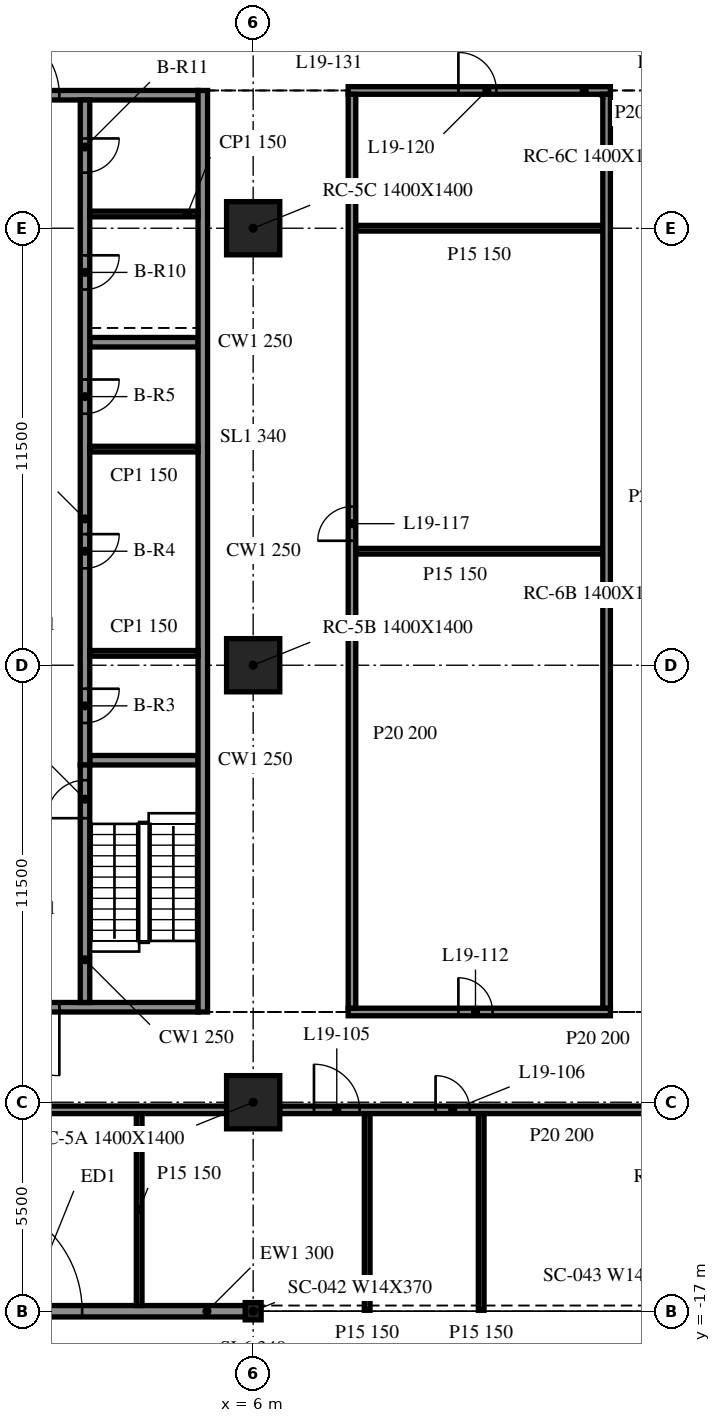
"""IFC4 building model, lengths in metres.
Left out: names, types, materials, properties, quantities, classifications, styles, units other than length and angle.
Written with IfcOpenShell. Run it as: python <this file> out.ifc"""

import sys

from ifc_helpers import new_model, si_unit, direction, frame, frame_2d, origin, origin_2d, place, context, subcontext, project, spatial, rectangle, i_section, extrude, element, fill, save


model = new_model("IFC4")
c1 = context("Model", 3, precision=1e-05, world=origin(), true_north=direction((0.0, 1.0)))
c2 = subcontext(c1, "Body", "Model", "MODEL_VIEW")
j1 = project(units=[si_unit("LENGTHUNIT", "METRE"), si_unit("PLANEANGLEUNIT", "RADIAN")], contexts=[c1])
p1 = place(None, origin())
s1 = spatial("IfcSite", under=j1, at=p1, CompositionType="ELEMENT")
p2 = place(p1, origin())
s2 = spatial("IfcBuilding", under=s1, at=p2, CompositionType="ELEMENT")
p3 = place(p2, frame((0.0, 0.0, 84.8)))
s3 = spatial("IfcBuildingStorey", under=s2, at=p3, CompositionType="ELEMENT", Elevation=84.8)
for number, where, z_axis, x_axis in (
    (1, (6.0, -11.5, -0.34), (0.0, 0.0, 1.0), (1.0, 0.0, 0.0)),
    (2, (6.0, 0.0, -0.34), (0.0, 0.0, 1.0), (1.0, 0.0, 0.0)),
    (3, (6.0, 11.5, -0.34), (0.0, 0.0, 1.0), (1.0, 0.0, 0.0)),
):
    element("IfcColumn", number, at=place(p3, frame(where, z_axis=z_axis, x_axis=x_axis)), inside=s3, PredefinedType="COLUMN", context=c2, shape_type="SweptSolid", body=[
        extrude(rectangle(XDim=1.4, YDim=1.4, at=origin_2d()), origin(), (0.0, 0.0, 1.0), 4.1),
    ])
p4 = place(p3, frame((6.0, -17.0, -0.34), z_axis=(0.0, 0.0, 1.0), x_axis=(1.0, 0.0, 0.0)))
e4 = element("IfcColumn", 4, at=p4, inside=s3, PredefinedType="COLUMN", context=c2, shape_type="SweptSolid", body=[
    extrude(i_section(OverallWidth=0.419, OverallDepth=0.455, WebThickness=0.042, FlangeThickness=0.068, at=origin_2d()), origin(), (0.0, 0.0, 1.0), 4.1),
])
p5 = place(p3, frame((-5.979, -17.0, 0.0), z_axis=(0.0, 0.0, 1.0), x_axis=(1.0, 0.0, 0.0)))
e5 = element("IfcWall", 5, at=p5, inside=s3, PredefinedType="NOTDEFINED", context=c2, shape_type="SweptSolid", body=[
    extrude(rectangle(XDim=11.958, YDim=0.3, at=frame_2d((5.979, 0.0))), origin(), (0.0, 0.0, 1.0), 3.003),
])
p6 = place(p5, frame((4.479, 0.0, 0.0)))
e6 = element("IfcOpeningElement", 6, at=p6, cuts=e5, PredefinedType="OPENING", context=c2, shape_type="SweptSolid", body=[
    extrude(rectangle(XDim=3.0, YDim=2.4, at=frame_2d((1.5, 1.2))), frame((0.0, 0.16, 0.0), z_axis=(0.0, -1.0, 0.0), x_axis=(1.0, 0.0, 0.0)), (0.0, 0.0, 1.0), 0.32),
])
p7 = place(p3, frame((4.675, -9.125, 0.0), z_axis=(0.0, 0.0, 1.0), x_axis=(0.0, 1.0, 0.0)))
e7 = element("IfcWall", 7, at=p7, inside=s3, PredefinedType="SOLIDWALL", context=c2, shape_type="SweptSolid", body=[
    extrude(rectangle(XDim=24.25, YDim=0.25, at=frame_2d((12.125, 0.0))), origin(), (0.0, 0.0, 1.0), 3.76),
])
p8 = place(p3, frame((4.55, -9.0, 0.0), z_axis=(0.0, 0.0, 1.0), x_axis=(-1.0, 0.0, 0.0)))
e8 = element("IfcWall", 8, at=p8, inside=s3, PredefinedType="SOLIDWALL", context=c2, shape_type="SweptSolid", body=[
    extrude(rectangle(XDim=9.1, YDim=0.25, at=frame_2d((4.55, 0.0))), origin(), (0.0, 0.0, 1.0), 3.76),
])
p9 = place(p8, frame((3.65, 0.0, 0.0)))
e9 = element("IfcOpeningElement", 9, at=p9, cuts=e8, PredefinedType="OPENING", context=c2, shape_type="SweptSolid", body=[
    extrude(rectangle(XDim=1.8, YDim=2.1, at=frame_2d((0.9, 1.05))), frame((0.0, 0.135, 0.0), z_axis=(0.0, -1.0, 0.0), x_axis=(1.0, 0.0, 0.0)), (0.0, 0.0, 1.0), 0.27),
])
p10 = place(p3, frame((-4.55, 15.0, 0.0), z_axis=(0.0, 0.0, 1.0), x_axis=(1.0, 0.0, 0.0)))
e10 = element("IfcWall", 10, at=p10, inside=s3, PredefinedType="SOLIDWALL", context=c2, shape_type="SweptSolid", body=[
    extrude(rectangle(XDim=9.1, YDim=0.25, at=frame_2d((4.55, 0.0))), origin(), (0.0, 0.0, 1.0), 3.76),
])
p11 = place(p10, frame((3.65, 0.0, 0.0)))
e11 = element("IfcOpeningElement", 11, at=p11, cuts=e10, PredefinedType="OPENING", context=c2, shape_type="SweptSolid", body=[
    extrude(rectangle(XDim=1.8, YDim=2.1, at=frame_2d((0.9, 1.05))), frame((0.0, 0.135, 0.0), z_axis=(0.0, -1.0, 0.0), x_axis=(1.0, 0.0, 0.0)), (0.0, 0.0, 1.0), 0.27),
])
p12 = place(p3, frame((1.575, -8.875, 0.0), z_axis=(0.0, 0.0, 1.0), x_axis=(0.0, 1.0, 0.0)))
e12 = element("IfcWall", 12, at=p12, inside=s3, PredefinedType="SOLIDWALL", context=c2, shape_type="SweptSolid", body=[
    extrude(rectangle(XDim=6.25, YDim=0.25, at=frame_2d((3.125, 0.0))), origin(), (0.0, 0.0, 1.0), 3.76),
])
p13 = place(p12, frame((4.85, 0.0, 0.0)))
e13 = element("IfcOpeningElement", 13, at=p13, cuts=e12, PredefinedType="OPENING", context=c2, shape_type="SweptSolid", body=[
    extrude(rectangle(XDim=1.0, YDim=2.1, at=frame_2d((0.5, 1.05))), frame((0.0, 0.135, 0.0), z_axis=(0.0, -1.0, 0.0), x_axis=(1.0, 0.0, 0.0)), (0.0, 0.0, 1.0), 0.27),
])
p14 = place(p3, frame((1.575, 14.875, 0.0), z_axis=(0.0, 0.0, 1.0), x_axis=(0.0, -1.0, 0.0)))
e14 = element("IfcWall", 14, at=p14, inside=s3, PredefinedType="SOLIDWALL", context=c2, shape_type="SweptSolid", body=[
    extrude(rectangle(XDim=17.5, YDim=0.25, at=frame_2d((8.75, 0.0))), origin(), (0.0, 0.0, 1.0), 3.76),
])
p15 = place(p14, frame((15.494, 0.0, 0.0)))
e15 = element("IfcOpeningElement", 15, at=p15, cuts=e14, PredefinedType="OPENING", context=c2, shape_type="SweptSolid", body=[
    extrude(rectangle(XDim=0.9, YDim=2.1, at=frame_2d((0.45, 1.05))), frame((0.0, 0.135, 0.0), z_axis=(0.0, -1.0, 0.0), x_axis=(1.0, 0.0, 0.0)), (0.0, 0.0, 1.0), 0.27),
])
p16 = place(p14, frame((11.425, 0.0, 0.0)))
e16 = element("IfcOpeningElement", 16, at=p16, cuts=e14, PredefinedType="OPENING", context=c2, shape_type="SweptSolid", body=[
    extrude(rectangle(XDim=0.9, YDim=2.1, at=frame_2d((0.45, 1.05))), frame((0.0, 0.135, 0.0), z_axis=(0.0, -1.0, 0.0), x_axis=(1.0, 0.0, 0.0)), (0.0, 0.0, 1.0), 0.27),
])
p17 = place(p14, frame((7.356, 0.0, 0.0)))
e17 = element("IfcOpeningElement", 17, at=p17, cuts=e14, PredefinedType="OPENING", context=c2, shape_type="SweptSolid", body=[
    extrude(rectangle(XDim=0.9, YDim=2.1, at=frame_2d((0.45, 1.05))), frame((0.0, 0.135, 0.0), z_axis=(0.0, -1.0, 0.0), x_axis=(1.0, 0.0, 0.0)), (0.0, 0.0, 1.0), 0.27),
])
p18 = place(p14, frame((4.087, 0.0, 0.0)))
e18 = element("IfcOpeningElement", 18, at=p18, cuts=e14, PredefinedType="OPENING", context=c2, shape_type="SweptSolid", body=[
    extrude(rectangle(XDim=0.9, YDim=2.1, at=frame_2d((0.45, 1.05))), frame((0.0, 0.135, 0.0), z_axis=(0.0, -1.0, 0.0), x_axis=(1.0, 0.0, 0.0)), (0.0, 0.0, 1.0), 0.27),
])
p19 = place(p14, frame((1.012, 0.0, 0.0)))
e19 = element("IfcOpeningElement", 19, at=p19, cuts=e14, PredefinedType="OPENING", context=c2, shape_type="SweptSolid", body=[
    extrude(rectangle(XDim=0.9, YDim=2.1, at=frame_2d((0.45, 1.05))), frame((0.0, 0.135, 0.0), z_axis=(0.0, -1.0, 0.0), x_axis=(1.0, 0.0, 0.0)), (0.0, 0.0, 1.0), 0.27),
])
for number, where, z_axis, x_axis in (
    (20, (1.7, -2.5, 0.0), (0.0, 0.0, 1.0), (1.0, 0.0, 0.0)),
    (21, (1.7, 8.5, 0.0), (0.0, 0.0, 1.0), (1.0, 0.0, 0.0)),
):
    element("IfcWall", number, at=place(p3, frame(where, z_axis=z_axis, x_axis=x_axis)), inside=s3, PredefinedType="SOLIDWALL", context=c2, shape_type="SweptSolid", body=[
        extrude(rectangle(XDim=2.85, YDim=0.25, at=frame_2d((1.425, 0.0))), origin(), (0.0, 0.0, 1.0), 3.76),
    ])
for number, where, z_axis, x_axis in (
    (22, (1.7, 0.312, 0.0), (0.0, 0.0, 1.0), (1.0, 0.0, 0.0)),
    (23, (1.7, 5.688, 0.0), (0.0, 0.0, 1.0), (1.0, 0.0, 0.0)),
    (24, (1.7, 11.875, 0.0), (0.0, 0.0, 1.0), (1.0, 0.0, 0.0)),
):
    element("IfcWall", number, at=place(p3, frame(where, z_axis=z_axis, x_axis=x_axis)), inside=s3, PredefinedType="PARTITIONING", context=c2, shape_type="SweptSolid", body=[
        extrude(rectangle(XDim=2.85, YDim=0.15, at=frame_2d((1.425, 0.0))), origin(), (0.0, 0.0, 1.0), 3.76),
    ])
p20 = place(p3, frame((-5.3, -11.7, 0.0), z_axis=(0.0, 0.0, 1.0), x_axis=(1.0, 0.0, 0.0)))
e25 = element("IfcWall", 25, at=p20, inside=s3, PredefinedType="PARTITIONING", context=c2, shape_type="SweptSolid", body=[
    extrude(rectangle(XDim=10.6, YDim=0.2, at=frame_2d((5.3, 0.0))), origin(), (0.0, 0.0, 1.0), 3.76),
])
p21 = place(p3, frame((6.7, -11.7, 0.0), z_axis=(0.0, 0.0, 1.0), x_axis=(1.0, 0.0, 0.0)))
e26 = element("IfcWall", 26, at=p21, inside=s3, PredefinedType="PARTITIONING", context=c2, shape_type="SweptSolid", body=[
    extrude(rectangle(XDim=10.6, YDim=0.2, at=frame_2d((5.3, 0.0))), origin(), (0.0, 0.0, 1.0), 3.76),
])
p22 = place(p21, frame((0.9, 0.0, 0.0)))
e27 = element("IfcOpeningElement", 27, at=p22, cuts=e26, PredefinedType="OPENING", context=c2, shape_type="SweptSolid", body=[
    extrude(rectangle(XDim=1.2, YDim=2.1, at=frame_2d((0.6, 1.05))), frame((0.0, 0.11, 0.0), z_axis=(0.0, -1.0, 0.0), x_axis=(1.0, 0.0, 0.0)), (0.0, 0.0, 1.0), 0.22),
])
p23 = place(p21, frame((4.1, 0.0, 0.0)))
e28 = element("IfcOpeningElement", 28, at=p23, cuts=e26, PredefinedType="OPENING", context=c2, shape_type="SweptSolid", body=[
    extrude(rectangle(XDim=0.9, YDim=2.1, at=frame_2d((0.45, 1.05))), frame((0.0, 0.11, 0.0), z_axis=(0.0, -1.0, 0.0), x_axis=(1.0, 0.0, 0.0)), (0.0, 0.0, 1.0), 0.22),
])
p24 = place(p3, frame((8.5, -9.125, 0.0), z_axis=(0.0, 0.0, 1.0), x_axis=(1.0, 0.0, 0.0)))
e29 = element("IfcWall", 29, at=p24, inside=s3, PredefinedType="PARTITIONING", context=c2, shape_type="SweptSolid", body=[
    extrude(rectangle(XDim=6.9, YDim=0.2, at=frame_2d((3.45, 0.0))), origin(), (0.0, 0.0, 1.0), 3.76),
])
p25 = place(p24, frame((2.9, 0.0, 0.0)))
e30 = element("IfcOpeningElement", 30, at=p25, cuts=e29, PredefinedType="OPENING", context=c2, shape_type="SweptSolid", body=[
    extrude(rectangle(XDim=0.9, YDim=2.1, at=frame_2d((0.45, 1.05))), frame((0.0, 0.11, 0.0), z_axis=(0.0, -1.0, 0.0), x_axis=(1.0, 0.0, 0.0)), (0.0, 0.0, 1.0), 0.22),
])
for number, where, z_axis, x_axis in (
    (31, (8.7, 3.0, 0.0), (0.0, 0.0, 1.0), (1.0, 0.0, 0.0)),
    (32, (8.7, 11.5, 0.0), (0.0, 0.0, 1.0), (1.0, 0.0, 0.0)),
):
    element("IfcWall", number, at=place(p3, frame(where, z_axis=z_axis, x_axis=x_axis)), inside=s3, PredefinedType="PARTITIONING", context=c2, shape_type="SweptSolid", body=[
        extrude(rectangle(XDim=6.5, YDim=0.15, at=frame_2d((3.25, 0.0))), origin(), (0.0, 0.0, 1.0), 3.76),
    ])
p26 = place(p3, frame((8.5, 15.125, 0.0), z_axis=(0.0, 0.0, 1.0), x_axis=(1.0, 0.0, 0.0)))
e33 = element("IfcWall", 33, at=p26, inside=s3, PredefinedType="PARTITIONING", context=c2, shape_type="SweptSolid", body=[
    extrude(rectangle(XDim=6.9, YDim=0.2, at=frame_2d((3.45, 0.0))), origin(), (0.0, 0.0, 1.0), 3.76),
])
p27 = place(p26, frame((2.9, 0.0, 0.0)))
e34 = element("IfcOpeningElement", 34, at=p27, cuts=e33, PredefinedType="OPENING", context=c2, shape_type="SweptSolid", body=[
    extrude(rectangle(XDim=1.0, YDim=2.1, at=frame_2d((0.5, 1.05))), frame((0.0, 0.11, 0.0), z_axis=(0.0, -1.0, 0.0), x_axis=(1.0, 0.0, 0.0)), (0.0, 0.0, 1.0), 0.22),
])
p28 = place(p3, frame((3.0, -16.85, 0.0), z_axis=(0.0, 0.0, 1.0), x_axis=(0.0, 1.0, 0.0)))
e35 = element("IfcWall", 35, at=p28, inside=s3, PredefinedType="PARTITIONING", context=c2, shape_type="SweptSolid", body=[
    extrude(rectangle(XDim=5.05, YDim=0.15, at=frame_2d((2.525, 0.0))), origin(), (0.0, 0.0, 1.0), 3.76),
])
p29 = place(p3, frame((8.6, -9.025, 0.0), z_axis=(0.0, 0.0, 1.0), x_axis=(0.0, 1.0, 0.0)))
e36 = element("IfcWall", 36, at=p29, inside=s3, PredefinedType="PARTITIONING", context=c2, shape_type="SweptSolid", body=[
    extrude(rectangle(XDim=24.05, YDim=0.2, at=frame_2d((12.025, 0.0))), origin(), (0.0, 0.0, 1.0), 3.76),
])
p30 = place(p29, frame((12.3, 0.0, 0.0)))
e37 = element("IfcOpeningElement", 37, at=p30, cuts=e36, PredefinedType="OPENING", context=c2, shape_type="SweptSolid", body=[
    extrude(rectangle(XDim=0.9, YDim=2.1, at=frame_2d((0.45, 1.05))), frame((0.0, 0.11, 0.0), z_axis=(0.0, -1.0, 0.0), x_axis=(1.0, 0.0, 0.0)), (0.0, 0.0, 1.0), 0.22),
])
for number, where, z_axis, x_axis in (
    (38, (9.0, -16.975, 0.0), (0.0, 0.0, 1.0), (0.0, 1.0, 0.0)),
    (39, (12.0, -16.975, 0.0), (0.0, 0.0, 1.0), (0.0, 1.0, 0.0)),
):
    element("IfcWall", number, at=place(p3, frame(where, z_axis=z_axis, x_axis=x_axis)), inside=s3, PredefinedType="PARTITIONING", context=c2, shape_type="SweptSolid", body=[
        extrude(rectangle(XDim=5.175, YDim=0.15, at=frame_2d((2.587, 0.0))), origin(), (0.0, 0.0, 1.0), 3.76),
    ])
p31 = place(p3, frame((15.3, -9.025, 0.0), z_axis=(0.0, 0.0, 1.0), x_axis=(0.0, 1.0, 0.0)))
e40 = element("IfcWall", 40, at=p31, inside=s3, PredefinedType="PARTITIONING", context=c2, shape_type="SweptSolid", body=[
    extrude(rectangle(XDim=24.05, YDim=0.2, at=frame_2d((12.025, 0.0))), origin(), (0.0, 0.0, 1.0), 3.76),
])
p32 = place(p6, origin())
e41 = element("IfcDoor", 41, at=p32, inside=s3, OperationType="SINGLE_SWING_LEFT", PredefinedType="DOOR", context=c2, shape_type="SweptSolid", body=[
    extrude(rectangle(XDim=3.0, YDim=2.4, at=frame_2d((1.5, 1.2))), frame((0.0, 0.025, 0.0), z_axis=(0.0, -1.0, 0.0), x_axis=(1.0, 0.0, 0.0)), (0.0, 0.0, 1.0), 0.05),
])
fill(e6, e41)
p33 = place(p9, origin())
e42 = element("IfcDoor", 42, at=p33, inside=s3, OperationType="DOUBLE_DOOR_SINGLE_SWING", PredefinedType="DOOR", context=c2, shape_type="SweptSolid", body=[
    extrude(rectangle(XDim=1.8, YDim=2.1, at=frame_2d((0.9, 1.05))), frame((0.0, 0.025, 0.0), z_axis=(0.0, -1.0, 0.0), x_axis=(1.0, 0.0, 0.0)), (0.0, 0.0, 1.0), 0.05),
])
fill(e9, e42)
p34 = place(p11, origin())
e43 = element("IfcDoor", 43, at=p34, inside=s3, OperationType="DOUBLE_DOOR_SINGLE_SWING", PredefinedType="DOOR", context=c2, shape_type="SweptSolid", body=[
    extrude(rectangle(XDim=1.8, YDim=2.1, at=frame_2d((0.9, 1.05))), frame((0.0, 0.025, 0.0), z_axis=(0.0, -1.0, 0.0), x_axis=(1.0, 0.0, 0.0)), (0.0, 0.0, 1.0), 0.05),
])
fill(e11, e43)
p35 = place(p15, origin())
e44 = element("IfcDoor", 44, at=p35, inside=s3, OperationType="SINGLE_SWING_LEFT", PredefinedType="DOOR", context=c2, shape_type="SweptSolid", body=[
    extrude(rectangle(XDim=0.9, YDim=2.1, at=frame_2d((0.45, 1.05))), frame((0.0, 0.025, 0.0), z_axis=(0.0, -1.0, 0.0), x_axis=(1.0, 0.0, 0.0)), (0.0, 0.0, 1.0), 0.05),
])
fill(e15, e44)
p36 = place(p16, origin())
e45 = element("IfcDoor", 45, at=p36, inside=s3, OperationType="SINGLE_SWING_RIGHT", PredefinedType="DOOR", context=c2, shape_type="SweptSolid", body=[
    extrude(rectangle(XDim=0.9, YDim=2.1, at=frame_2d((0.45, 1.05))), frame((0.0, 0.025, 0.0), z_axis=(0.0, -1.0, 0.0), x_axis=(1.0, 0.0, 0.0)), (0.0, 0.0, 1.0), 0.05),
])
fill(e16, e45)
p37 = place(p17, origin())
e46 = element("IfcDoor", 46, at=p37, inside=s3, OperationType="SINGLE_SWING_LEFT", PredefinedType="DOOR", context=c2, shape_type="SweptSolid", body=[
    extrude(rectangle(XDim=0.9, YDim=2.1, at=frame_2d((0.45, 1.05))), frame((0.0, 0.025, 0.0), z_axis=(0.0, -1.0, 0.0), x_axis=(1.0, 0.0, 0.0)), (0.0, 0.0, 1.0), 0.05),
])
fill(e17, e46)
p38 = place(p18, origin())
e47 = element("IfcDoor", 47, at=p38, inside=s3, OperationType="SINGLE_SWING_RIGHT", PredefinedType="DOOR", context=c2, shape_type="SweptSolid", body=[
    extrude(rectangle(XDim=0.9, YDim=2.1, at=frame_2d((0.45, 1.05))), frame((0.0, 0.025, 0.0), z_axis=(0.0, -1.0, 0.0), x_axis=(1.0, 0.0, 0.0)), (0.0, 0.0, 1.0), 0.05),
])
fill(e18, e47)
p39 = place(p19, origin())
e48 = element("IfcDoor", 48, at=p39, inside=s3, OperationType="SINGLE_SWING_LEFT", PredefinedType="DOOR", context=c2, shape_type="SweptSolid", body=[
    extrude(rectangle(XDim=0.9, YDim=2.1, at=frame_2d((0.45, 1.05))), frame((0.0, 0.025, 0.0), z_axis=(0.0, -1.0, 0.0), x_axis=(1.0, 0.0, 0.0)), (0.0, 0.0, 1.0), 0.05),
])
fill(e19, e48)
p40 = place(p13, origin())
e49 = element("IfcDoor", 49, at=p40, inside=s3, OperationType="SINGLE_SWING_RIGHT", PredefinedType="DOOR", context=c2, shape_type="SweptSolid", body=[
    extrude(rectangle(XDim=1.0, YDim=2.1, at=frame_2d((0.5, 1.05))), frame((0.0, 0.025, 0.0), z_axis=(0.0, -1.0, 0.0), x_axis=(1.0, 0.0, 0.0)), (0.0, 0.0, 1.0), 0.05),
])
fill(e13, e49)
p41 = place(p22, origin())
e50 = element("IfcDoor", 50, at=p41, inside=s3, OperationType="SINGLE_SWING_RIGHT", PredefinedType="DOOR", context=c2, shape_type="SweptSolid", body=[
    extrude(rectangle(XDim=1.2, YDim=2.1, at=frame_2d((0.6, 1.05))), frame((0.0, 0.025, 0.0), z_axis=(0.0, -1.0, 0.0), x_axis=(1.0, 0.0, 0.0)), (0.0, 0.0, 1.0), 0.05),
])
fill(e27, e50)
p42 = place(p23, origin())
e51 = element("IfcDoor", 51, at=p42, inside=s3, OperationType="SINGLE_SWING_RIGHT", PredefinedType="DOOR", context=c2, shape_type="SweptSolid", body=[
    extrude(rectangle(XDim=0.9, YDim=2.1, at=frame_2d((0.45, 1.05))), frame((0.0, 0.025, 0.0), z_axis=(0.0, -1.0, 0.0), x_axis=(1.0, 0.0, 0.0)), (0.0, 0.0, 1.0), 0.05),
])
fill(e28, e51)
p43 = place(p25, origin())
e52 = element("IfcDoor", 52, at=p43, inside=s3, OperationType="SINGLE_SWING_LEFT", PredefinedType="DOOR", context=c2, shape_type="SweptSolid", body=[
    extrude(rectangle(XDim=0.9, YDim=2.1, at=frame_2d((0.45, 1.05))), frame((0.0, 0.025, 0.0), z_axis=(0.0, -1.0, 0.0), x_axis=(1.0, 0.0, 0.0)), (0.0, 0.0, 1.0), 0.05),
])
fill(e30, e52)
p44 = place(p30, origin())
e53 = element("IfcDoor", 53, at=p44, inside=s3, OperationType="SINGLE_SWING_LEFT", PredefinedType="DOOR", context=c2, shape_type="SweptSolid", body=[
    extrude(rectangle(XDim=0.9, YDim=2.1, at=frame_2d((0.45, 1.05))), frame((0.0, 0.025, 0.0), z_axis=(0.0, -1.0, 0.0), x_axis=(1.0, 0.0, 0.0)), (0.0, 0.0, 1.0), 0.05),
])
fill(e37, e53)
p45 = place(p27, origin())
e54 = element("IfcDoor", 54, at=p45, inside=s3, OperationType="SINGLE_SWING_RIGHT", PredefinedType="DOOR", context=c2, shape_type="SweptSolid", body=[
    extrude(rectangle(XDim=1.0, YDim=2.1, at=frame_2d((0.5, 1.05))), frame((0.0, 0.025, 0.0), z_axis=(0.0, -1.0, 0.0), x_axis=(1.0, 0.0, 0.0)), (0.0, 0.0, 1.0), 0.05),
])
fill(e34, e54)
save(model, sys.argv[1])
